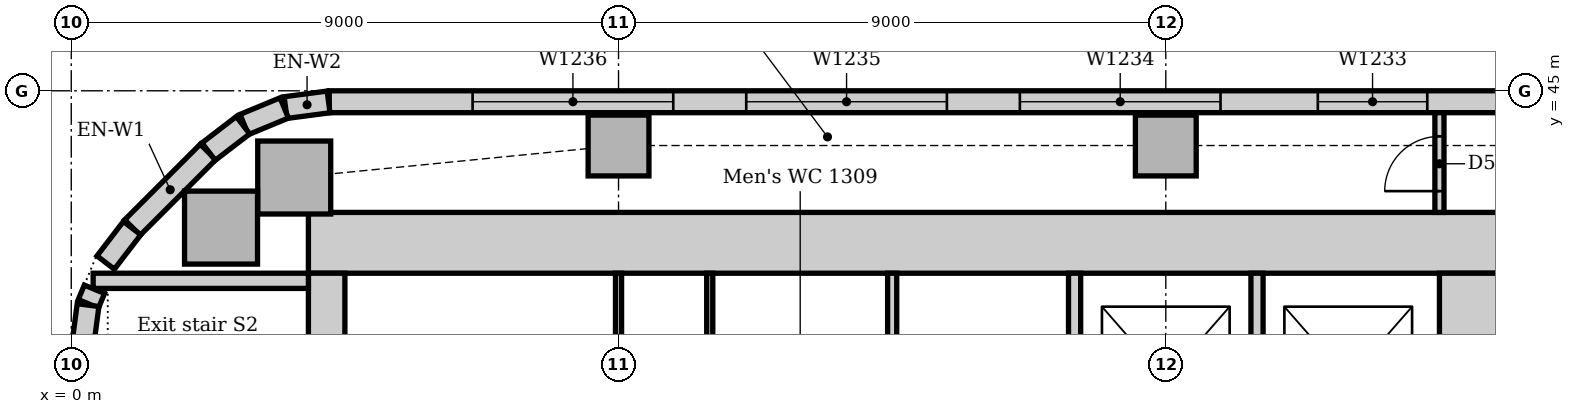
"""IFC4 building model, lengths in metres.
Left out: names, types, materials, properties, quantities, classifications, styles, units other than length and angle.
Written with IfcOpenShell. Run it as: python <this file> out.ifc"""

import sys

from ifc_helpers import new_model, si_unit, direction, frame, frame_2d, origin, origin_2d, place, context, subcontext, project, spatial, rectangle, extrude, element, fill, save


model = new_model("IFC4")
c1 = context("Model", 3, precision=1e-05, world=origin(), true_north=direction((0.0, 1.0)))
c2 = subcontext(c1, "Body", "Model", "MODEL_VIEW")
j1 = project(units=[si_unit("LENGTHUNIT", "METRE"), si_unit("PLANEANGLEUNIT", "RADIAN")], contexts=[c1])
p1 = place(None, origin())
s1 = spatial("IfcSite", under=j1, at=p1, CompositionType="ELEMENT")
p2 = place(p1, origin())
s2 = spatial("IfcBuilding", under=s1, at=p2, CompositionType="ELEMENT")
p3 = place(p2, frame((0.0, 0.0, 59.0)))
s3 = spatial("IfcBuildingStorey", under=s2, at=p3, CompositionType="ELEMENT", Elevation=59.0)
p4 = place(p3, frame((23.5, 42.5, 0.0), z_axis=(0.0, 0.0, 1.0), x_axis=(-1.0, 0.0, 0.0)))
e1 = element("IfcWall", 1, at=p4, inside=s3, PredefinedType="SOLIDWALL", context=c2, shape_type="SweptSolid", body=[
    extrude(rectangle(XDim=19.6, YDim=1.0, at=frame_2d((9.8, 0.0))), origin(), (0.0, 0.0, 1.0), 4.0),
])
p5 = place(p3, frame((23.0, 31.5, 0.0), z_axis=(0.0, 0.0, 1.0), x_axis=(0.0, 1.0, 0.0)))
e2 = element("IfcWall", 2, at=p5, inside=s3, PredefinedType="SOLIDWALL", context=c2, shape_type="SweptSolid", body=[
    extrude(rectangle(XDim=10.5, YDim=1.0, at=frame_2d((5.25, 0.0))), origin(), (0.0, 0.0, 1.0), 4.0),
])
p6 = place(p5, frame((3.15, 0.0, 0.0)))
e3 = element("IfcOpeningElement", 3, at=p6, cuts=e2, PredefinedType="OPENING", context=c2, shape_type="SweptSolid", body=[
    extrude(rectangle(XDim=1.0, YDim=2.1, at=frame_2d((0.5, 1.05))), frame((0.0, 0.51, 0.0), z_axis=(0.0, -1.0, 0.0), x_axis=(1.0, 0.0, 0.0)), (0.0, 0.0, 1.0), 1.02),
])
p7 = place(p5, frame((5.2, 0.0, 0.0)))
e4 = element("IfcOpeningElement", 4, at=p7, cuts=e2, PredefinedType="OPENING", context=c2, shape_type="SweptSolid", body=[
    extrude(rectangle(XDim=1.0, YDim=2.1, at=frame_2d((0.5, 1.05))), frame((0.0, 0.51, 0.0), z_axis=(0.0, -1.0, 0.0), x_axis=(1.0, 0.0, 0.0)), (0.0, 0.0, 1.0), 1.02),
])
p8 = place(p3, frame((4.2, 42.0, 0.0), z_axis=(0.0, 0.0, 1.0), x_axis=(0.0, -1.0, 0.0)))
e5 = element("IfcWall", 5, at=p8, inside=s3, PredefinedType="SOLIDWALL", context=c2, shape_type="SweptSolid", body=[
    extrude(rectangle(XDim=10.5, YDim=0.6, at=frame_2d((5.25, 0.0))), origin(), (0.0, 0.0, 1.0), 4.0),
])
p9 = place(p8, frame((5.3, 0.0, 0.0)))
e6 = element("IfcOpeningElement", 6, at=p9, cuts=e5, PredefinedType="OPENING", context=c2, shape_type="SweptSolid", body=[
    extrude(rectangle(XDim=1.0, YDim=2.1, at=frame_2d((0.5, 1.05))), frame((0.0, 0.31, 0.0), z_axis=(0.0, -1.0, 0.0), x_axis=(1.0, 0.0, 0.0)), (0.0, 0.0, 1.0), 0.62),
])
p10 = place(p3, frame((3.9, 41.875, 0.0), z_axis=(0.0, 0.0, 1.0), x_axis=(-1.0, 0.0, 0.0)))
e7 = element("IfcWall", 7, at=p10, inside=s3, PredefinedType="SOLIDWALL", context=c2, shape_type="SweptSolid", body=[
    extrude(rectangle(XDim=3.54, YDim=0.25, at=frame_2d((1.77, 0.0))), origin(), (0.0, 0.0, 1.0), 4.0),
])
for number, where, z_axis, x_axis in (
    (8, (3.667, 43.574, 0.0), (0.0, 0.0, 1.0), (1.0, 0.0, 0.0)),
    (9, (2.463, 42.75, 0.0), (0.0, 0.0, 1.0), (1.0, 0.0, 0.0)),
):
    element("IfcColumn", number, at=place(p3, frame(where, z_axis=z_axis, x_axis=x_axis)), inside=s3, PredefinedType="COLUMN", context=c2, shape_type="SweptSolid", body=[
        extrude(rectangle(XDim=1.2, YDim=1.2, at=origin_2d()), origin(), (0.0, 0.0, 1.0), 3.85),
    ])
for number, where, z_axis, x_axis in (
    (10, (9.0, 44.1, 0.0), (0.0, 0.0, 1.0), (1.0, 0.0, 0.0)),
    (11, (18.0, 44.1, 0.0), (0.0, 0.0, 1.0), (1.0, 0.0, 0.0)),
):
    element("IfcColumn", number, at=place(p3, frame(where, z_axis=z_axis, x_axis=x_axis)), inside=s3, PredefinedType="COLUMN", context=c2, shape_type="SweptSolid", body=[
        extrude(rectangle(XDim=1.0, YDim=1.0, at=origin_2d()), origin(), (0.0, 0.0, 1.0), 3.85),
    ])
p11 = place(p3, frame((48.257, 44.82, 0.0), z_axis=(0.0, 0.0, 1.0), x_axis=(-1.0, 0.0, 0.0)))
e12 = element("IfcWall", 12, at=p11, inside=s3, PredefinedType="STANDARD", context=c2, shape_type="SweptSolid", body=[
    extrude(rectangle(XDim=44.015, YDim=0.36, at=frame_2d((22.007, 0.0))), origin(), (0.0, 0.0, 1.0), 3.85),
])
p12 = place(p11, frame((2.357, 0.0, 0.9)))
e13 = element("IfcOpeningElement", 13, at=p12, cuts=e12, PredefinedType="OPENING", context=c2, shape_type="SweptSolid", body=[
    extrude(rectangle(XDim=3.3, YDim=1.6, at=frame_2d((1.65, 0.8))), frame((0.0, 0.19, 0.0), z_axis=(0.0, -1.0, 0.0), x_axis=(1.0, 0.0, 0.0)), (0.0, 0.0, 1.0), 0.38),
])
p13 = place(p11, frame((6.857, 0.0, 0.9)))
e14 = element("IfcOpeningElement", 14, at=p13, cuts=e12, PredefinedType="OPENING", context=c2, shape_type="SweptSolid", body=[
    extrude(rectangle(XDim=3.3, YDim=1.6, at=frame_2d((1.65, 0.8))), frame((0.0, 0.19, 0.0), z_axis=(0.0, -1.0, 0.0), x_axis=(1.0, 0.0, 0.0)), (0.0, 0.0, 1.0), 0.38),
])
p14 = place(p11, frame((11.357, 0.0, 0.9)))
e15 = element("IfcOpeningElement", 15, at=p14, cuts=e12, PredefinedType="OPENING", context=c2, shape_type="SweptSolid", body=[
    extrude(rectangle(XDim=3.3, YDim=1.6, at=frame_2d((1.65, 0.8))), frame((0.0, 0.19, 0.0), z_axis=(0.0, -1.0, 0.0), x_axis=(1.0, 0.0, 0.0)), (0.0, 0.0, 1.0), 0.38),
])
p15 = place(p11, frame((15.857, 0.0, 0.9)))
e16 = element("IfcOpeningElement", 16, at=p15, cuts=e12, PredefinedType="OPENING", context=c2, shape_type="SweptSolid", body=[
    extrude(rectangle(XDim=3.3, YDim=1.6, at=frame_2d((1.65, 0.8))), frame((0.0, 0.19, 0.0), z_axis=(0.0, -1.0, 0.0), x_axis=(1.0, 0.0, 0.0)), (0.0, 0.0, 1.0), 0.38),
])
p16 = place(p11, frame((20.357, 0.0, 0.9)))
e17 = element("IfcOpeningElement", 17, at=p16, cuts=e12, PredefinedType="OPENING", context=c2, shape_type="SweptSolid", body=[
    extrude(rectangle(XDim=3.3, YDim=1.6, at=frame_2d((1.65, 0.8))), frame((0.0, 0.19, 0.0), z_axis=(0.0, -1.0, 0.0), x_axis=(1.0, 0.0, 0.0)), (0.0, 0.0, 1.0), 0.38),
])
p17 = place(p11, frame((25.957, 0.0, 0.9)))
e18 = element("IfcOpeningElement", 18, at=p17, cuts=e12, PredefinedType="OPENING", context=c2, shape_type="SweptSolid", body=[
    extrude(rectangle(XDim=1.8, YDim=1.6, at=frame_2d((0.9, 0.8))), frame((0.0, 0.19, 0.0), z_axis=(0.0, -1.0, 0.0), x_axis=(1.0, 0.0, 0.0)), (0.0, 0.0, 1.0), 0.38),
])
p18 = place(p11, frame((29.357, 0.0, 0.9)))
e19 = element("IfcOpeningElement", 19, at=p18, cuts=e12, PredefinedType="OPENING", context=c2, shape_type="SweptSolid", body=[
    extrude(rectangle(XDim=3.3, YDim=1.6, at=frame_2d((1.65, 0.8))), frame((0.0, 0.19, 0.0), z_axis=(0.0, -1.0, 0.0), x_axis=(1.0, 0.0, 0.0)), (0.0, 0.0, 1.0), 0.38),
])
p19 = place(p11, frame((33.857, 0.0, 0.9)))
e20 = element("IfcOpeningElement", 20, at=p19, cuts=e12, PredefinedType="OPENING", context=c2, shape_type="SweptSolid", body=[
    extrude(rectangle(XDim=3.3, YDim=1.6, at=frame_2d((1.65, 0.8))), frame((0.0, 0.19, 0.0), z_axis=(0.0, -1.0, 0.0), x_axis=(1.0, 0.0, 0.0)), (0.0, 0.0, 1.0), 0.38),
])
p20 = place(p11, frame((38.357, 0.0, 0.9)))
e21 = element("IfcOpeningElement", 21, at=p20, cuts=e12, PredefinedType="OPENING", context=c2, shape_type="SweptSolid", body=[
    extrude(rectangle(XDim=3.3, YDim=1.6, at=frame_2d((1.65, 0.8))), frame((0.0, 0.19, 0.0), z_axis=(0.0, -1.0, 0.0), x_axis=(1.0, 0.0, 0.0)), (0.0, 0.0, 1.0), 0.38),
])
p21 = place(p3, frame((2.249, 43.994, 0.0), z_axis=(0.0, 0.0, 1.0), x_axis=(-0.707106781187, -0.707106781187, 0.0)))
e22 = element("IfcWall", 22, at=p21, inside=s3, PredefinedType="STANDARD", context=c2, shape_type="SweptSolid", body=[
    extrude(rectangle(XDim=1.757, YDim=0.36, at=frame_2d((0.879, 0.0))), origin(), (0.0, 0.0, 1.0), 3.85),
])
for number, where, z_axis, x_axis in (
    (23, (4.231, 44.817, 0.0), (0.0, 0.0, 1.0), (-0.991, -0.131, 0.0)),
    (24, (3.503, 44.718, 0.0), (0.0, 0.0, 1.0), (-0.924, -0.383, 0.0)),
):
    element("IfcWall", number, at=place(p3, frame(where, z_axis=z_axis, x_axis=x_axis)), inside=s3, PredefinedType="STANDARD", context=c2, shape_type="SweptSolid", body=[
        extrude(rectangle(XDim=0.713, YDim=0.36, at=frame_2d((0.356, 0.0))), origin(), (0.0, 0.0, 1.0), 3.85),
    ])
for number, where, z_axis, x_axis in (
    (25, (2.825, 44.434, 0.0), (0.0, 0.0, 1.0), (-0.793, -0.609, 0.0)),
    (26, (1.0, 42.741, 0.0), (0.0, 0.0, 1.0), (-0.609, -0.793, 0.0)),
):
    element("IfcWall", number, at=place(p3, frame(where, z_axis=z_axis, x_axis=x_axis)), inside=s3, PredefinedType="STANDARD", context=c2, shape_type="SweptSolid", body=[
        extrude(rectangle(XDim=0.713, YDim=0.36, at=frame_2d((0.357, 0.0))), origin(), (0.0, 0.0, 1.0), 3.85),
    ])
p22 = place(p3, frame((0.381, 41.736, 0.0), z_axis=(0.0, 0.0, 1.0), x_axis=(-0.382773360986, -0.923842277729, 0.0)))
e27 = element("IfcWall", 27, at=p22, inside=s3, PredefinedType="STANDARD", context=c2, shape_type="SweptSolid", body=[
    extrude(rectangle(XDim=0.258, YDim=0.36, at=frame_2d((0.129, 0.0))), origin(), (0.0, 0.0, 1.0), 3.85),
])
p23 = place(p3, frame((0.276, 41.476, 0.0), z_axis=(0.0, 0.0, 1.0), x_axis=(-0.13055608231, -0.99144092581, 0.0)))
e28 = element("IfcWall", 28, at=p23, inside=s3, PredefinedType="STANDARD", context=c2, shape_type="SweptSolid", body=[
    extrude(rectangle(XDim=0.713, YDim=0.36, at=frame_2d((0.356, 0.0))), origin(), (0.0, 0.0, 1.0), 3.85),
])
for number, where, z_axis, x_axis in (
    (29, (16.5, 38.6, 0.0), (0.0, 0.0, 1.0), (0.0, 1.0, 0.0)),
    (30, (19.5, 38.6, 0.0), (0.0, 0.0, 1.0), (0.0, 1.0, 0.0)),
):
    element("IfcWall", number, at=place(p3, frame(where, z_axis=z_axis, x_axis=x_axis)), inside=s3, PredefinedType="PARTITIONING", context=c2, shape_type="SweptSolid", body=[
        extrude(rectangle(XDim=3.4, YDim=0.2, at=frame_2d((1.7, 0.0))), origin(), (0.0, 0.0, 1.0), 3.85),
    ])
p24 = place(p3, frame((22.5, 43.0, 0.0), z_axis=(0.0, 0.0, 1.0), x_axis=(0.0, 1.0, 0.0)))
e31 = element("IfcWall", 31, at=p24, inside=s3, PredefinedType="PARTITIONING", context=c2, shape_type="SweptSolid", body=[
    extrude(rectangle(XDim=1.64, YDim=0.15, at=frame_2d((0.82, 0.0))), origin(), (0.0, 0.0, 1.0), 3.85),
])
p25 = place(p24, frame((0.35, 0.0, 0.0)))
e32 = element("IfcOpeningElement", 32, at=p25, cuts=e31, PredefinedType="OPENING", context=c2, shape_type="SweptSolid", body=[
    extrude(rectangle(XDim=0.9, YDim=2.1, at=frame_2d((0.45, 1.05))), frame((0.0, 0.085, 0.0), z_axis=(0.0, -1.0, 0.0), x_axis=(1.0, 0.0, 0.0)), (0.0, 0.0, 1.0), 0.17),
])
p26 = place(p3, frame((13.5, 38.575, 0.0), z_axis=(0.0, 0.0, 1.0), x_axis=(0.0, 1.0, 0.0)))
e33 = element("IfcWall", 33, at=p26, inside=s3, PredefinedType="PARTITIONING", context=c2, shape_type="SweptSolid", body=[
    extrude(rectangle(XDim=3.425, YDim=0.15, at=frame_2d((1.712, 0.0))), origin(), (0.0, 0.0, 1.0), 3.85),
])
for number, where, z_axis, x_axis in (
    (34, (9.0, 38.575, 0.0), (0.0, 0.0, 1.0), (0.0, 1.0, 0.0)),
    (35, (10.5, 38.575, 0.0), (0.0, 0.0, 1.0), (0.0, 1.0, 0.0)),
):
    element("IfcWall", number, at=place(p3, frame(where, z_axis=z_axis, x_axis=x_axis)), inside=s3, PredefinedType="PARTITIONING", context=c2, shape_type="SweptSolid", body=[
        extrude(rectangle(XDim=3.425, YDim=0.1, at=frame_2d((1.712, 0.0))), origin(), (0.0, 0.0, 1.0), 3.85),
    ])
p27 = place(p17, origin())
e36 = element("IfcWindow", 36, at=p27, inside=s3, PartitioningType="SINGLE_PANEL", PredefinedType="WINDOW", context=c2, shape_type="SweptSolid", body=[
    extrude(rectangle(XDim=1.8, YDim=1.6, at=frame_2d((0.9, 0.8))), frame((0.0, 0.13, 0.0), z_axis=(0.0, -1.0, 0.0), x_axis=(1.0, 0.0, 0.0)), (0.0, 0.0, 1.0), 0.06),
])
fill(e18, e36)
p28 = place(p18, origin())
e37 = element("IfcWindow", 37, at=p28, inside=s3, PartitioningType="SINGLE_PANEL", PredefinedType="WINDOW", context=c2, shape_type="SweptSolid", body=[
    extrude(rectangle(XDim=3.3, YDim=1.6, at=frame_2d((1.65, 0.8))), frame((0.0, 0.13, 0.0), z_axis=(0.0, -1.0, 0.0), x_axis=(1.0, 0.0, 0.0)), (0.0, 0.0, 1.0), 0.06),
])
fill(e19, e37)
p29 = place(p19, origin())
e38 = element("IfcWindow", 38, at=p29, inside=s3, PartitioningType="SINGLE_PANEL", PredefinedType="WINDOW", context=c2, shape_type="SweptSolid", body=[
    extrude(rectangle(XDim=3.3, YDim=1.6, at=frame_2d((1.65, 0.8))), frame((0.0, 0.13, 0.0), z_axis=(0.0, -1.0, 0.0), x_axis=(1.0, 0.0, 0.0)), (0.0, 0.0, 1.0), 0.06),
])
fill(e20, e38)
p30 = place(p20, origin())
e39 = element("IfcWindow", 39, at=p30, inside=s3, PartitioningType="SINGLE_PANEL", PredefinedType="WINDOW", context=c2, shape_type="SweptSolid", body=[
    extrude(rectangle(XDim=3.3, YDim=1.6, at=frame_2d((1.65, 0.8))), frame((0.0, 0.13, 0.0), z_axis=(0.0, -1.0, 0.0), x_axis=(1.0, 0.0, 0.0)), (0.0, 0.0, 1.0), 0.06),
])
fill(e21, e39)
p31 = place(p25, origin())
e40 = element("IfcDoor", 40, at=p31, inside=s3, OperationType="SINGLE_SWING_LEFT", PredefinedType="DOOR", context=c2, shape_type="SweptSolid", body=[
    extrude(rectangle(XDim=0.9, YDim=2.1, at=frame_2d((0.45, 1.05))), frame((0.0, 0.025, 0.0), z_axis=(0.0, -1.0, 0.0), x_axis=(1.0, 0.0, 0.0)), (0.0, 0.0, 1.0), 0.05),
])
fill(e32, e40)
save(model, sys.argv[1])
